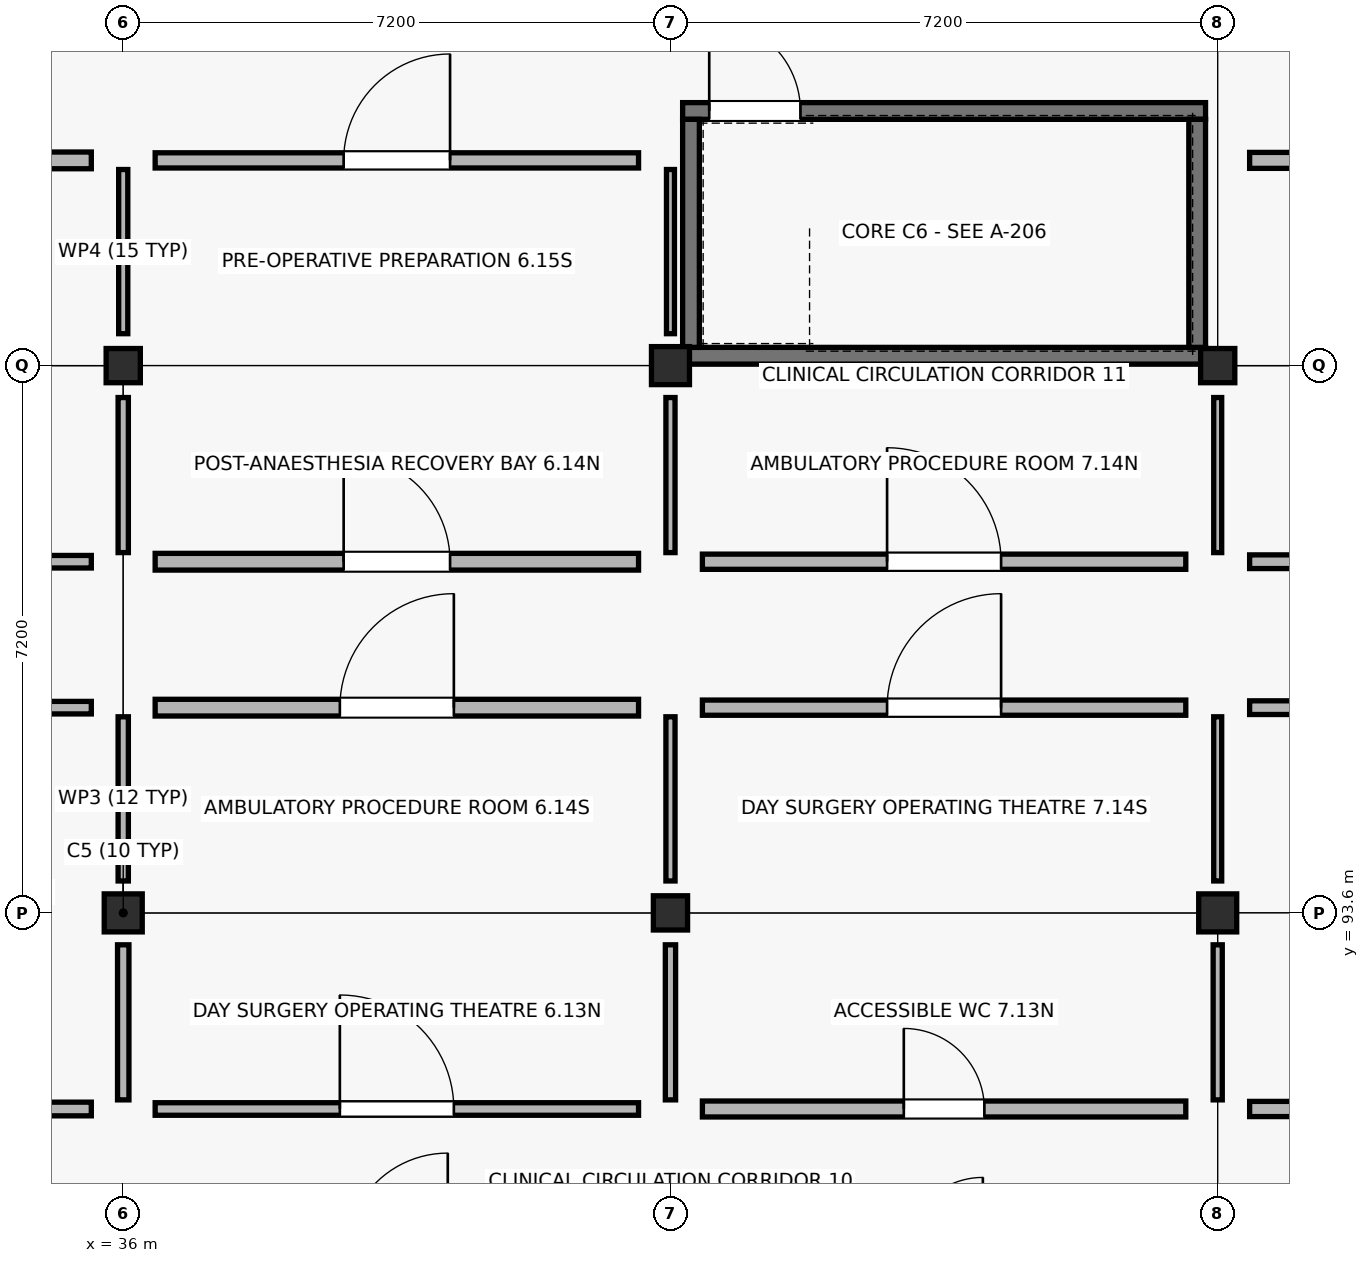
"""IFC4 building model, lengths in metres.
Left out: names, types, materials, properties, quantities, classifications, styles, units other than length and angle.
Written with IfcOpenShell. Run it as: python <this file> out.ifc"""

import sys

from ifc_helpers import new_model, si_unit, direction, frame, frame_2d, origin, origin_2d, place, context, subcontext, project, spatial, rectangle, extrude, element, fill, save


model = new_model("IFC4")
c1 = context("Model", 3, precision=1e-05, world=origin(), true_north=direction((0.0, 1.0)))
c2 = subcontext(c1, "Body", "Model", "MODEL_VIEW")
j1 = project(units=[si_unit("LENGTHUNIT", "METRE"), si_unit("PLANEANGLEUNIT", "RADIAN")], contexts=[c1])
p1 = place(None, origin())
s1 = spatial("IfcSite", under=j1, at=p1, CompositionType="ELEMENT")
p2 = place(p1, origin())
s2 = spatial("IfcBuilding", under=s1, at=p2, CompositionType="ELEMENT")
p3 = place(p2, frame((0.0, 0.0, 9.0)))
s3 = spatial("IfcBuildingStorey", under=s2, at=p3, CompositionType="ELEMENT", Elevation=9.0)
p4 = place(p3, frame((36.0, 93.6, 0.0), z_axis=(0.0, 0.0, 1.0), x_axis=(1.0, 0.0, 0.0)))
e1 = element("IfcColumn", 1, at=p4, inside=s3, PredefinedType="COLUMN", context=c2, shape_type="SweptSolid", body=[
    extrude(rectangle(XDim=0.5, YDim=0.5, at=origin_2d()), origin(), (0.0, 0.0, 1.0), 4.28),
])
for number, where, z_axis, x_axis in (
    (2, (36.0, 100.8, 0.0), (0.0, 0.0, 1.0), (1.0, 0.0, 0.0)),
    (3, (43.2, 93.6, 0.0), (0.0, 0.0, 1.0), (1.0, 0.0, 0.0)),
):
    element("IfcColumn", number, at=place(p3, frame(where, z_axis=z_axis, x_axis=x_axis)), inside=s3, PredefinedType="COLUMN", context=c2, shape_type="SweptSolid", body=[
        extrude(rectangle(XDim=0.45, YDim=0.45, at=origin_2d()), origin(), (0.0, 0.0, 1.0), 4.28),
    ])
for number, where, z_axis, x_axis in (
    (4, (43.2, 100.8, 0.0), (0.0, 0.0, 1.0), (1.0, 0.0, 0.0)),
    (5, (50.4, 93.6, 0.0), (0.0, 0.0, 1.0), (1.0, 0.0, 0.0)),
):
    element("IfcColumn", number, at=place(p3, frame(where, z_axis=z_axis, x_axis=x_axis)), inside=s3, PredefinedType="COLUMN", context=c2, shape_type="SweptSolid", body=[
        extrude(rectangle(XDim=0.5, YDim=0.5, at=origin_2d()), origin(), (0.0, 0.0, 1.0), 4.28),
    ])
p5 = place(p3, frame((50.4, 100.8, 0.0), z_axis=(0.0, 0.0, 1.0), x_axis=(1.0, 0.0, 0.0)))
e6 = element("IfcColumn", 6, at=p5, inside=s3, PredefinedType="COLUMN", context=c2, shape_type="SweptSolid", body=[
    extrude(rectangle(XDim=0.45, YDim=0.45, at=origin_2d()), origin(), (0.0, 0.0, 1.0), 4.28),
])
p6 = place(p3, frame((43.36, 100.93, 0.0), z_axis=(0.0, 0.0, 1.0), x_axis=(1.0, 0.0, 0.0)))
e7 = element("IfcWall", 7, at=p6, inside=s3, PredefinedType="SHEAR", context=c2, shape_type="SweptSolid", body=[
    extrude(rectangle(XDim=6.88, YDim=0.22, at=frame_2d((3.44, 0.0))), origin(), (0.0, 0.0, 1.0), 4.24),
])
p7 = place(p3, frame((43.36, 104.15, 0.0), z_axis=(0.0, 0.0, 1.0), x_axis=(1.0, 0.0, 0.0)))
e8 = element("IfcWall", 8, at=p7, inside=s3, PredefinedType="SHEAR", context=c2, shape_type="SweptSolid", body=[
    extrude(rectangle(XDim=6.88, YDim=0.22, at=frame_2d((3.44, 0.0))), origin(), (0.0, 0.0, 1.0), 4.24),
])
p8 = place(p7, frame((0.35, 0.0, 0.0)))
e9 = element("IfcOpeningElement", 9, at=p8, cuts=e8, PredefinedType="OPENING", context=c2, shape_type="SweptSolid", body=[
    extrude(rectangle(XDim=1.2, YDim=2.15, at=frame_2d((0.6, 1.075))), frame((0.0, 0.12, 0.0), z_axis=(0.0, -1.0, 0.0), x_axis=(1.0, 0.0, 0.0)), (0.0, 0.0, 1.0), 0.24),
])
for number, where, z_axis, x_axis in (
    (10, (43.47, 101.04, 0.0), (0.0, 0.0, 1.0), (0.0, 1.0, 0.0)),
    (11, (50.13, 101.04, 0.0), (0.0, 0.0, 1.0), (0.0, 1.0, 0.0)),
):
    element("IfcWall", number, at=place(p3, frame(where, z_axis=z_axis, x_axis=x_axis)), inside=s3, PredefinedType="SHEAR", context=c2, shape_type="SweptSolid", body=[
        extrude(rectangle(XDim=3.0, YDim=0.22, at=frame_2d((1.5, 0.0))), origin(), (0.0, 0.0, 1.0), 4.24),
    ])
p9 = place(p3, frame((29.22, 91.02, 0.0), z_axis=(0.0, 0.0, 1.0), x_axis=(1.0, 0.0, 0.0)))
e12 = element("IfcWall", 12, at=p9, inside=s3, PredefinedType="PARTITIONING", context=c2, shape_type="SweptSolid", body=[
    extrude(rectangle(XDim=6.36, YDim=0.18, at=frame_2d((3.18, 0.0))), origin(), (0.0, 0.0, 1.0), 3.38),
])
p10 = place(p9, frame((2.43, 0.0, 0.0)))
e13 = element("IfcOpeningElement", 13, at=p10, cuts=e12, PredefinedType="OPENING", context=c2, shape_type="SweptSolid", body=[
    extrude(rectangle(XDim=1.5, YDim=2.2, at=frame_2d((0.75, 1.1))), frame((0.0, 0.1, 0.0), z_axis=(0.0, -1.0, 0.0), x_axis=(1.0, 0.0, 0.0)), (0.0, 0.0, 1.0), 0.2),
])
p11 = place(p3, frame((36.0, 91.14, 0.0), z_axis=(0.0, 0.0, 1.0), x_axis=(0.0, 1.0, 0.0)))
e14 = element("IfcWall", 14, at=p11, inside=s3, PredefinedType="PARTITIONING", context=c2, shape_type="SweptSolid", body=[
    extrude(rectangle(XDim=2.04, YDim=0.15, at=frame_2d((1.02, 0.0))), origin(), (0.0, 0.0, 1.0), 3.38),
])
p12 = place(p3, frame((29.22, 96.3, 0.0), z_axis=(0.0, 0.0, 1.0), x_axis=(1.0, 0.0, 0.0)))
e15 = element("IfcWall", 15, at=p12, inside=s3, PredefinedType="PARTITIONING", context=c2, shape_type="SweptSolid", body=[
    extrude(rectangle(XDim=6.36, YDim=0.165, at=frame_2d((3.18, 0.0))), origin(), (0.0, 0.0, 1.0), 3.38),
])
p13 = place(p12, frame((2.48, 0.0, 0.0)))
e16 = element("IfcOpeningElement", 16, at=p13, cuts=e15, PredefinedType="OPENING", context=c2, shape_type="SweptSolid", body=[
    extrude(rectangle(XDim=1.4, YDim=2.2, at=frame_2d((0.7, 1.1))), frame((0.0, 0.093, 0.0), z_axis=(0.0, -1.0, 0.0), x_axis=(1.0, 0.0, 0.0)), (0.0, 0.0, 1.0), 0.185),
])
p14 = place(p3, frame((36.0, 94.02, 0.0), z_axis=(0.0, 0.0, 1.0), x_axis=(0.0, 1.0, 0.0)))
e17 = element("IfcWall", 17, at=p14, inside=s3, PredefinedType="PARTITIONING", context=c2, shape_type="SweptSolid", body=[
    extrude(rectangle(XDim=2.16, YDim=0.135, at=frame_2d((1.08, 0.0))), origin(), (0.0, 0.0, 1.0), 3.38),
])
p15 = place(p3, frame((29.22, 98.22, 0.0), z_axis=(0.0, 0.0, 1.0), x_axis=(1.0, 0.0, 0.0)))
e18 = element("IfcWall", 18, at=p15, inside=s3, PredefinedType="PARTITIONING", context=c2, shape_type="SweptSolid", body=[
    extrude(rectangle(XDim=6.36, YDim=0.165, at=frame_2d((3.18, 0.0))), origin(), (0.0, 0.0, 1.0), 3.38),
])
p16 = place(p15, frame((2.48, 0.0, 0.0)))
e19 = element("IfcOpeningElement", 19, at=p16, cuts=e18, PredefinedType="OPENING", context=c2, shape_type="SweptSolid", body=[
    extrude(rectangle(XDim=1.4, YDim=2.2, at=frame_2d((0.7, 1.1))), frame((0.0, 0.093, 0.0), z_axis=(0.0, -1.0, 0.0), x_axis=(1.0, 0.0, 0.0)), (0.0, 0.0, 1.0), 0.185),
])
p17 = place(p3, frame((36.0, 98.34, 0.0), z_axis=(0.0, 0.0, 1.0), x_axis=(0.0, 1.0, 0.0)))
e20 = element("IfcWall", 20, at=p17, inside=s3, PredefinedType="PARTITIONING", context=c2, shape_type="SweptSolid", body=[
    extrude(rectangle(XDim=2.04, YDim=0.135, at=frame_2d((1.02, 0.0))), origin(), (0.0, 0.0, 1.0), 3.38),
])
p18 = place(p3, frame((29.22, 103.5, 0.0), z_axis=(0.0, 0.0, 1.0), x_axis=(1.0, 0.0, 0.0)))
e21 = element("IfcWall", 21, at=p18, inside=s3, PredefinedType="SOLIDWALL", context=c2, shape_type="SweptSolid", body=[
    extrude(rectangle(XDim=6.36, YDim=0.22, at=frame_2d((3.18, 0.0))), origin(), (0.0, 0.0, 1.0), 3.38),
])
p19 = place(p18, frame((2.59, 0.0, 0.0)))
e22 = element("IfcOpeningElement", 22, at=p19, cuts=e21, PredefinedType="OPENING", context=c2, shape_type="SweptSolid", body=[
    extrude(rectangle(XDim=1.18, YDim=2.14, at=frame_2d((0.59, 1.07))), frame((0.0, 0.12, 0.0), z_axis=(0.0, -1.0, 0.0), x_axis=(1.0, 0.0, 0.0)), (0.0, 0.0, 1.0), 0.24),
])
p20 = place(p3, frame((36.0, 101.22, 0.0), z_axis=(0.0, 0.0, 1.0), x_axis=(0.0, 1.0, 0.0)))
e23 = element("IfcWall", 23, at=p20, inside=s3, PredefinedType="PARTITIONING", context=c2, shape_type="SweptSolid", body=[
    extrude(rectangle(XDim=2.16, YDim=0.12, at=frame_2d((1.08, 0.0))), origin(), (0.0, 0.0, 1.0), 3.38),
])
p21 = place(p3, frame((36.42, 91.02, 0.0), z_axis=(0.0, 0.0, 1.0), x_axis=(1.0, 0.0, 0.0)))
e24 = element("IfcWall", 24, at=p21, inside=s3, PredefinedType="PARTITIONING", context=c2, shape_type="SweptSolid", body=[
    extrude(rectangle(XDim=6.36, YDim=0.165, at=frame_2d((3.18, 0.0))), origin(), (0.0, 0.0, 1.0), 3.38),
])
p22 = place(p21, frame((2.43, 0.0, 0.0)))
e25 = element("IfcOpeningElement", 25, at=p22, cuts=e24, PredefinedType="OPENING", context=c2, shape_type="SweptSolid", body=[
    extrude(rectangle(XDim=1.5, YDim=2.2, at=frame_2d((0.75, 1.1))), frame((0.0, 0.093, 0.0), z_axis=(0.0, -1.0, 0.0), x_axis=(1.0, 0.0, 0.0)), (0.0, 0.0, 1.0), 0.185),
])
p23 = place(p3, frame((43.2, 91.14, 0.0), z_axis=(0.0, 0.0, 1.0), x_axis=(0.0, 1.0, 0.0)))
e26 = element("IfcWall", 26, at=p23, inside=s3, PredefinedType="PARTITIONING", context=c2, shape_type="SweptSolid", body=[
    extrude(rectangle(XDim=2.04, YDim=0.135, at=frame_2d((1.02, 0.0))), origin(), (0.0, 0.0, 1.0), 3.38),
])
p24 = place(p3, frame((36.42, 96.3, 0.0), z_axis=(0.0, 0.0, 1.0), x_axis=(1.0, 0.0, 0.0)))
e27 = element("IfcWall", 27, at=p24, inside=s3, PredefinedType="SOLIDWALL", context=c2, shape_type="SweptSolid", body=[
    extrude(rectangle(XDim=6.36, YDim=0.22, at=frame_2d((3.18, 0.0))), origin(), (0.0, 0.0, 1.0), 3.38),
])
p25 = place(p24, frame((2.43, 0.0, 0.0)))
e28 = element("IfcOpeningElement", 28, at=p25, cuts=e27, PredefinedType="OPENING", context=c2, shape_type="SweptSolid", body=[
    extrude(rectangle(XDim=1.5, YDim=2.2, at=frame_2d((0.75, 1.1))), frame((0.0, 0.12, 0.0), z_axis=(0.0, -1.0, 0.0), x_axis=(1.0, 0.0, 0.0)), (0.0, 0.0, 1.0), 0.24),
])
p26 = place(p3, frame((43.2, 94.02, 0.0), z_axis=(0.0, 0.0, 1.0), x_axis=(0.0, 1.0, 0.0)))
e29 = element("IfcWall", 29, at=p26, inside=s3, PredefinedType="PARTITIONING", context=c2, shape_type="SweptSolid", body=[
    extrude(rectangle(XDim=2.16, YDim=0.12, at=frame_2d((1.08, 0.0))), origin(), (0.0, 0.0, 1.0), 3.38),
])
p27 = place(p3, frame((36.42, 98.22, 0.0), z_axis=(0.0, 0.0, 1.0), x_axis=(1.0, 0.0, 0.0)))
e30 = element("IfcWall", 30, at=p27, inside=s3, PredefinedType="SOLIDWALL", context=c2, shape_type="SweptSolid", body=[
    extrude(rectangle(XDim=6.36, YDim=0.22, at=frame_2d((3.18, 0.0))), origin(), (0.0, 0.0, 1.0), 3.38),
])
p28 = place(p27, frame((2.48, 0.0, 0.0)))
e31 = element("IfcOpeningElement", 31, at=p28, cuts=e30, PredefinedType="OPENING", context=c2, shape_type="SweptSolid", body=[
    extrude(rectangle(XDim=1.4, YDim=2.2, at=frame_2d((0.7, 1.1))), frame((0.0, 0.12, 0.0), z_axis=(0.0, -1.0, 0.0), x_axis=(1.0, 0.0, 0.0)), (0.0, 0.0, 1.0), 0.24),
])
p29 = place(p3, frame((43.2, 98.34, 0.0), z_axis=(0.0, 0.0, 1.0), x_axis=(0.0, 1.0, 0.0)))
e32 = element("IfcWall", 32, at=p29, inside=s3, PredefinedType="PARTITIONING", context=c2, shape_type="SweptSolid", body=[
    extrude(rectangle(XDim=2.04, YDim=0.12, at=frame_2d((1.02, 0.0))), origin(), (0.0, 0.0, 1.0), 3.38),
])
p30 = place(p3, frame((36.42, 103.5, 0.0), z_axis=(0.0, 0.0, 1.0), x_axis=(1.0, 0.0, 0.0)))
e33 = element("IfcWall", 33, at=p30, inside=s3, PredefinedType="SOLIDWALL", context=c2, shape_type="SweptSolid", body=[
    extrude(rectangle(XDim=6.36, YDim=0.2, at=frame_2d((3.18, 0.0))), origin(), (0.0, 0.0, 1.0), 3.38),
])
p31 = place(p30, frame((2.48, 0.0, 0.0)))
e34 = element("IfcOpeningElement", 34, at=p31, cuts=e33, PredefinedType="OPENING", context=c2, shape_type="SweptSolid", body=[
    extrude(rectangle(XDim=1.4, YDim=2.2, at=frame_2d((0.7, 1.1))), frame((0.0, 0.11, 0.0), z_axis=(0.0, -1.0, 0.0), x_axis=(1.0, 0.0, 0.0)), (0.0, 0.0, 1.0), 0.22),
])
p32 = place(p3, frame((43.2, 101.22, 0.0), z_axis=(0.0, 0.0, 1.0), x_axis=(0.0, 1.0, 0.0)))
e35 = element("IfcWall", 35, at=p32, inside=s3, PredefinedType="PARTITIONING", context=c2, shape_type="SweptSolid", body=[
    extrude(rectangle(XDim=2.16, YDim=0.105, at=frame_2d((1.08, 0.0))), origin(), (0.0, 0.0, 1.0), 3.38),
])
p33 = place(p3, frame((43.62, 91.02, 0.0), z_axis=(0.0, 0.0, 1.0), x_axis=(1.0, 0.0, 0.0)))
e36 = element("IfcWall", 36, at=p33, inside=s3, PredefinedType="PLUMBINGWALL", context=c2, shape_type="SweptSolid", body=[
    extrude(rectangle(XDim=6.36, YDim=0.21, at=frame_2d((3.18, 0.0))), origin(), (0.0, 0.0, 1.0), 3.38),
])
p34 = place(p33, frame((2.65, 0.0, 0.0)))
e37 = element("IfcOpeningElement", 37, at=p34, cuts=e36, PredefinedType="OPENING", context=c2, shape_type="SweptSolid", body=[
    extrude(rectangle(XDim=1.06, YDim=2.19, at=frame_2d((0.53, 1.095))), frame((0.0, 0.115, 0.0), z_axis=(0.0, -1.0, 0.0), x_axis=(1.0, 0.0, 0.0)), (0.0, 0.0, 1.0), 0.23),
])
p35 = place(p3, frame((50.4, 91.14, 0.0), z_axis=(0.0, 0.0, 1.0), x_axis=(0.0, 1.0, 0.0)))
e38 = element("IfcWall", 38, at=p35, inside=s3, PredefinedType="PARTITIONING", context=c2, shape_type="SweptSolid", body=[
    extrude(rectangle(XDim=2.04, YDim=0.12, at=frame_2d((1.02, 0.0))), origin(), (0.0, 0.0, 1.0), 3.38),
])
p36 = place(p3, frame((43.62, 96.3, 0.0), z_axis=(0.0, 0.0, 1.0), x_axis=(1.0, 0.0, 0.0)))
e39 = element("IfcWall", 39, at=p36, inside=s3, PredefinedType="SOLIDWALL", context=c2, shape_type="SweptSolid", body=[
    extrude(rectangle(XDim=6.36, YDim=0.2, at=frame_2d((3.18, 0.0))), origin(), (0.0, 0.0, 1.0), 3.38),
])
p37 = place(p36, frame((2.43, 0.0, 0.0)))
e40 = element("IfcOpeningElement", 40, at=p37, cuts=e39, PredefinedType="OPENING", context=c2, shape_type="SweptSolid", body=[
    extrude(rectangle(XDim=1.5, YDim=2.2, at=frame_2d((0.75, 1.1))), frame((0.0, 0.11, 0.0), z_axis=(0.0, -1.0, 0.0), x_axis=(1.0, 0.0, 0.0)), (0.0, 0.0, 1.0), 0.22),
])
p38 = place(p3, frame((50.4, 94.02, 0.0), z_axis=(0.0, 0.0, 1.0), x_axis=(0.0, 1.0, 0.0)))
e41 = element("IfcWall", 41, at=p38, inside=s3, PredefinedType="PARTITIONING", context=c2, shape_type="SweptSolid", body=[
    extrude(rectangle(XDim=2.16, YDim=0.105, at=frame_2d((1.08, 0.0))), origin(), (0.0, 0.0, 1.0), 3.38),
])
p39 = place(p3, frame((43.62, 98.22, 0.0), z_axis=(0.0, 0.0, 1.0), x_axis=(1.0, 0.0, 0.0)))
e42 = element("IfcWall", 42, at=p39, inside=s3, PredefinedType="SOLIDWALL", context=c2, shape_type="SweptSolid", body=[
    extrude(rectangle(XDim=6.36, YDim=0.2, at=frame_2d((3.18, 0.0))), origin(), (0.0, 0.0, 1.0), 3.38),
])
p40 = place(p39, frame((2.43, 0.0, 0.0)))
e43 = element("IfcOpeningElement", 43, at=p40, cuts=e42, PredefinedType="OPENING", context=c2, shape_type="SweptSolid", body=[
    extrude(rectangle(XDim=1.5, YDim=2.2, at=frame_2d((0.75, 1.1))), frame((0.0, 0.11, 0.0), z_axis=(0.0, -1.0, 0.0), x_axis=(1.0, 0.0, 0.0)), (0.0, 0.0, 1.0), 0.22),
])
p41 = place(p3, frame((50.4, 98.34, 0.0), z_axis=(0.0, 0.0, 1.0), x_axis=(0.0, 1.0, 0.0)))
e44 = element("IfcWall", 44, at=p41, inside=s3, PredefinedType="PARTITIONING", context=c2, shape_type="SweptSolid", body=[
    extrude(rectangle(XDim=2.04, YDim=0.105, at=frame_2d((1.02, 0.0))), origin(), (0.0, 0.0, 1.0), 3.38),
])
p42 = place(p3, frame((50.82, 91.02, 0.0), z_axis=(0.0, 0.0, 1.0), x_axis=(1.0, 0.0, 0.0)))
e45 = element("IfcWall", 45, at=p42, inside=s3, PredefinedType="SOLIDWALL", context=c2, shape_type="SweptSolid", body=[
    extrude(rectangle(XDim=6.36, YDim=0.2, at=frame_2d((3.18, 0.0))), origin(), (0.0, 0.0, 1.0), 3.38),
])
p43 = place(p42, frame((2.53, 0.0, 0.0)))
e46 = element("IfcOpeningElement", 46, at=p43, cuts=e45, PredefinedType="OPENING", context=c2, shape_type="SweptSolid", body=[
    extrude(rectangle(XDim=1.3, YDim=2.19, at=frame_2d((0.65, 1.095))), frame((0.0, 0.11, 0.0), z_axis=(0.0, -1.0, 0.0), x_axis=(1.0, 0.0, 0.0)), (0.0, 0.0, 1.0), 0.22),
])
p44 = place(p3, frame((50.82, 96.3, 0.0), z_axis=(0.0, 0.0, 1.0), x_axis=(1.0, 0.0, 0.0)))
e47 = element("IfcWall", 47, at=p44, inside=s3, PredefinedType="PARTITIONING", context=c2, shape_type="SweptSolid", body=[
    extrude(rectangle(XDim=6.36, YDim=0.18, at=frame_2d((3.18, 0.0))), origin(), (0.0, 0.0, 1.0), 3.38),
])
p45 = place(p44, frame((2.43, 0.0, 0.0)))
e48 = element("IfcOpeningElement", 48, at=p45, cuts=e47, PredefinedType="OPENING", context=c2, shape_type="SweptSolid", body=[
    extrude(rectangle(XDim=1.5, YDim=2.2, at=frame_2d((0.75, 1.1))), frame((0.0, 0.1, 0.0), z_axis=(0.0, -1.0, 0.0), x_axis=(1.0, 0.0, 0.0)), (0.0, 0.0, 1.0), 0.2),
])
p46 = place(p3, frame((50.82, 98.22, 0.0), z_axis=(0.0, 0.0, 1.0), x_axis=(1.0, 0.0, 0.0)))
e49 = element("IfcWall", 49, at=p46, inside=s3, PredefinedType="PARTITIONING", context=c2, shape_type="SweptSolid", body=[
    extrude(rectangle(XDim=6.36, YDim=0.18, at=frame_2d((3.18, 0.0))), origin(), (0.0, 0.0, 1.0), 3.38),
])
p47 = place(p46, frame((2.49, 0.0, 0.0)))
e50 = element("IfcOpeningElement", 50, at=p47, cuts=e49, PredefinedType="OPENING", context=c2, shape_type="SweptSolid", body=[
    extrude(rectangle(XDim=1.38, YDim=2.19, at=frame_2d((0.69, 1.095))), frame((0.0, 0.1, 0.0), z_axis=(0.0, -1.0, 0.0), x_axis=(1.0, 0.0, 0.0)), (0.0, 0.0, 1.0), 0.2),
])
p48 = place(p3, frame((50.82, 103.5, 0.0), z_axis=(0.0, 0.0, 1.0), x_axis=(1.0, 0.0, 0.0)))
e51 = element("IfcWall", 51, at=p48, inside=s3, PredefinedType="PLUMBINGWALL", context=c2, shape_type="SweptSolid", body=[
    extrude(rectangle(XDim=6.36, YDim=0.21, at=frame_2d((3.18, 0.0))), origin(), (0.0, 0.0, 1.0), 3.38),
])
p49 = place(p48, frame((2.47, 0.0, 0.0)))
e52 = element("IfcOpeningElement", 52, at=p49, cuts=e51, PredefinedType="OPENING", context=c2, shape_type="SweptSolid", body=[
    extrude(rectangle(XDim=1.42, YDim=2.19, at=frame_2d((0.71, 1.095))), frame((0.0, 0.115, 0.0), z_axis=(0.0, -1.0, 0.0), x_axis=(1.0, 0.0, 0.0)), (0.0, 0.0, 1.0), 0.23),
])
p50 = place(p8, origin())
e53 = element("IfcDoor", 53, at=p50, inside=s3, OperationType="SINGLE_SWING_LEFT", PredefinedType="DOOR", context=c2, shape_type="SweptSolid", body=[
    extrude(rectangle(XDim=1.2, YDim=2.15, at=frame_2d((0.6, 1.075))), frame((0.0, 0.025, 0.0), z_axis=(0.0, -1.0, 0.0), x_axis=(1.0, 0.0, 0.0)), (0.0, 0.0, 1.0), 0.05),
])
fill(e9, e53)
p51 = place(p22, origin())
e54 = element("IfcDoor", 54, at=p51, inside=s3, OperationType="SINGLE_SWING_LEFT", PredefinedType="DOOR", context=c2, shape_type="SweptSolid", body=[
    extrude(rectangle(XDim=1.5, YDim=2.2, at=frame_2d((0.75, 1.1))), frame((0.0, 0.025, 0.0), z_axis=(0.0, -1.0, 0.0), x_axis=(1.0, 0.0, 0.0)), (0.0, 0.0, 1.0), 0.05),
])
fill(e25, e54)
p52 = place(p25, origin())
e55 = element("IfcDoor", 55, at=p52, inside=s3, OperationType="SINGLE_SWING_RIGHT", PredefinedType="DOOR", context=c2, shape_type="SweptSolid", body=[
    extrude(rectangle(XDim=1.5, YDim=2.2, at=frame_2d((0.75, 1.1))), frame((0.0, 0.025, 0.0), z_axis=(0.0, -1.0, 0.0), x_axis=(1.0, 0.0, 0.0)), (0.0, 0.0, 1.0), 0.05),
])
fill(e28, e55)
p53 = place(p28, origin())
e56 = element("IfcDoor", 56, at=p53, inside=s3, OperationType="SINGLE_SWING_LEFT", PredefinedType="DOOR", context=c2, shape_type="SweptSolid", body=[
    extrude(rectangle(XDim=1.4, YDim=2.2, at=frame_2d((0.7, 1.1))), frame((0.0, 0.025, 0.0), z_axis=(0.0, -1.0, 0.0), x_axis=(1.0, 0.0, 0.0)), (0.0, 0.0, 1.0), 0.05),
])
fill(e31, e56)
p54 = place(p31, origin())
e57 = element("IfcDoor", 57, at=p54, inside=s3, OperationType="SINGLE_SWING_RIGHT", PredefinedType="DOOR", context=c2, shape_type="SweptSolid", body=[
    extrude(rectangle(XDim=1.4, YDim=2.2, at=frame_2d((0.7, 1.1))), frame((0.0, 0.025, 0.0), z_axis=(0.0, -1.0, 0.0), x_axis=(1.0, 0.0, 0.0)), (0.0, 0.0, 1.0), 0.05),
])
fill(e34, e57)
p55 = place(p34, origin())
e58 = element("IfcDoor", 58, at=p55, inside=s3, OperationType="SINGLE_SWING_LEFT", PredefinedType="DOOR", context=c2, shape_type="SweptSolid", body=[
    extrude(rectangle(XDim=1.06, YDim=2.19, at=frame_2d((0.53, 1.095))), frame((0.0, 0.025, 0.0), z_axis=(0.0, -1.0, 0.0), x_axis=(1.0, 0.0, 0.0)), (0.0, 0.0, 1.0), 0.05),
])
fill(e37, e58)
p56 = place(p37, origin())
e59 = element("IfcDoor", 59, at=p56, inside=s3, OperationType="SINGLE_SWING_RIGHT", PredefinedType="DOOR", context=c2, shape_type="SweptSolid", body=[
    extrude(rectangle(XDim=1.5, YDim=2.2, at=frame_2d((0.75, 1.1))), frame((0.0, 0.025, 0.0), z_axis=(0.0, -1.0, 0.0), x_axis=(1.0, 0.0, 0.0)), (0.0, 0.0, 1.0), 0.05),
])
fill(e40, e59)
p57 = place(p40, origin())
e60 = element("IfcDoor", 60, at=p57, inside=s3, OperationType="SINGLE_SWING_LEFT", PredefinedType="DOOR", context=c2, shape_type="SweptSolid", body=[
    extrude(rectangle(XDim=1.5, YDim=2.2, at=frame_2d((0.75, 1.1))), frame((0.0, 0.025, 0.0), z_axis=(0.0, -1.0, 0.0), x_axis=(1.0, 0.0, 0.0)), (0.0, 0.0, 1.0), 0.05),
])
fill(e43, e60)
save(model, sys.argv[1])
